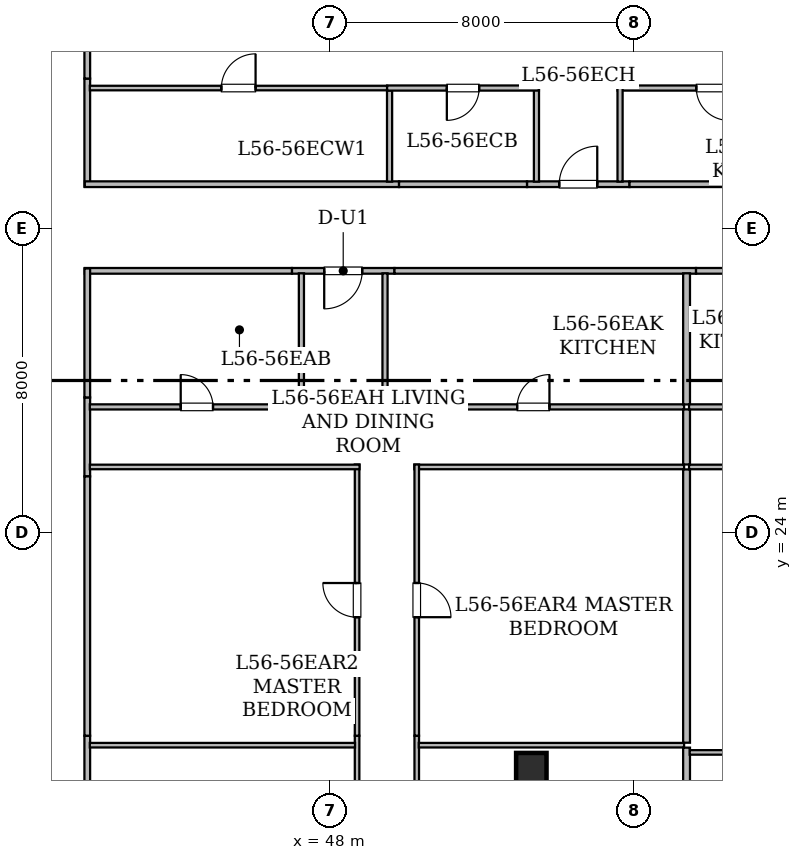
"""IFC4 building model, lengths in metres.
Left out: names, types, materials, properties, quantities, classifications, styles, units other than length and angle.
Written with IfcOpenShell. Run it as: python <this file> out.ifc"""

import sys

from ifc_helpers import new_model, si_unit, direction, frame, frame_2d, origin, origin_2d, place, context, subcontext, project, spatial, rectangle, hollow_rectangle, extrude, element, fill, save


model = new_model("IFC4")
c1 = context("Model", 3, precision=1e-05, world=origin(), true_north=direction((0.0, 1.0)))
c2 = subcontext(c1, "Body", "Model", "MODEL_VIEW")
j1 = project(units=[si_unit("LENGTHUNIT", "METRE"), si_unit("PLANEANGLEUNIT", "RADIAN")], contexts=[c1])
p1 = place(None, origin())
s1 = spatial("IfcSite", under=j1, at=p1, CompositionType="ELEMENT")
p2 = place(p1, origin())
s2 = spatial("IfcBuilding", under=s1, at=p2, CompositionType="ELEMENT")
p3 = place(p2, frame((0.0, 0.0, 220.85)))
s3 = spatial("IfcBuildingStorey", under=s2, at=p3, CompositionType="ELEMENT", Elevation=220.85)
p4 = place(p3, frame((53.3, 17.8, 0.0), z_axis=(0.0, 0.0, 1.0), x_axis=(1.0, 0.0, 0.0)))
e1 = element("IfcColumn", 1, at=p4, inside=s3, PredefinedType="COLUMN", context=c2, shape_type="SweptSolid", body=[
    extrude(hollow_rectangle(XDim=0.8, YDim=0.8, WallThickness=0.04, at=origin_2d()), origin(), (0.0, 0.0, 1.0), 3.65),
])
p5 = place(p3, frame((49.699, 30.885, 0.0), z_axis=(0.0, 0.0, 1.0), x_axis=(-1.0, 0.0, 0.0)))
e2 = element("IfcWall", 2, at=p5, inside=s3, PredefinedType="STANDARD", context=c2, shape_type="SweptSolid", body=[
    extrude(rectangle(XDim=2.698, YDim=0.15, at=frame_2d((1.349, 0.0))), origin(), (0.0, 0.0, 1.0), 3.43),
])
p6 = place(p5, frame((0.849, 0.0, 0.0)))
e3 = element("IfcOpeningElement", 3, at=p6, cuts=e2, PredefinedType="OPENING", context=c2, shape_type="SweptSolid", body=[
    extrude(rectangle(XDim=1.0, YDim=2.15, at=frame_2d((0.5, 1.075))), frame((0.0, 0.085, 0.0), z_axis=(0.0, -1.0, 0.0), x_axis=(1.0, 0.0, 0.0)), (0.0, 0.0, 1.0), 0.17),
])
p7 = place(p3, frame((41.615, 27.554, 0.0), z_axis=(0.0, 0.0, 1.0), x_axis=(0.0, -1.0, 0.0)))
e4 = element("IfcWall", 4, at=p7, inside=s3, PredefinedType="STANDARD", context=c2, shape_type="SweptSolid", body=[
    extrude(rectangle(XDim=2.078, YDim=0.15, at=frame_2d((1.039, 0.0))), origin(), (0.0, 0.0, 1.0), 3.43),
])
p8 = place(p3, frame((47.001, 30.885, 0.0), z_axis=(0.0, 0.0, 1.0), x_axis=(-1.0, 0.0, 0.0)))
e5 = element("IfcWall", 5, at=p8, inside=s3, PredefinedType="STANDARD", context=c2, shape_type="SweptSolid", body=[
    extrude(rectangle(XDim=5.451, YDim=0.15, at=frame_2d((2.726, 0.0))), origin(), (0.0, 0.0, 1.0), 3.43),
])
p9 = place(p3, frame((41.615, 30.948, 0.0), z_axis=(0.0, 0.0, 1.0), x_axis=(0.0, -1.0, 0.0)))
e6 = element("IfcWall", 6, at=p9, inside=s3, PredefinedType="STANDARD", context=c2, shape_type="SweptSolid", body=[
    extrude(rectangle(XDim=3.394, YDim=0.15, at=frame_2d((1.697, 0.0))), origin(), (0.0, 0.0, 1.0), 3.43),
])
p10 = place(p3, frame((57.634, 30.885, 0.0), z_axis=(0.0, 0.0, 1.0), x_axis=(-1.0, 0.0, 0.0)))
e7 = element("IfcWall", 7, at=p10, inside=s3, PredefinedType="STANDARD", context=c2, shape_type="SweptSolid", body=[
    extrude(rectangle(XDim=7.935, YDim=0.15, at=frame_2d((3.968, 0.0))), origin(), (0.0, 0.0, 1.0), 2.725),
])
p11 = place(p3, frame((41.615, 18.653, 0.0), z_axis=(0.0, 0.0, 1.0), x_axis=(0.0, -1.0, 0.0)))
e8 = element("IfcWall", 8, at=p11, inside=s3, PredefinedType="STANDARD", context=c2, shape_type="SweptSolid", body=[
    extrude(rectangle(XDim=1.753, YDim=0.15, at=frame_2d((0.876, 0.0))), origin(), (0.0, 0.0, 1.0), 2.725),
])
p12 = place(p3, frame((41.615, 25.476, 0.0), z_axis=(0.0, 0.0, 1.0), x_axis=(0.0, -1.0, 0.0)))
e9 = element("IfcWall", 9, at=p12, inside=s3, PredefinedType="STANDARD", context=c2, shape_type="SweptSolid", body=[
    extrude(rectangle(XDim=6.823, YDim=0.15, at=frame_2d((3.412, 0.0))), origin(), (0.0, 0.0, 1.0), 2.725),
])
p13 = place(p3, frame((62.142, 30.885, 0.0), z_axis=(0.0, 0.0, 1.0), x_axis=(-1.0, 0.0, 0.0)))
e10 = element("IfcWall", 10, at=p13, inside=s3, PredefinedType="STANDARD", context=c2, shape_type="SweptSolid", body=[
    extrude(rectangle(XDim=4.508, YDim=0.15, at=frame_2d((2.254, 0.0))), origin(), (0.0, 0.0, 1.0), 3.43),
])
p14 = place(p3, frame((41.615, 35.944, 0.0), z_axis=(0.0, 0.0, 1.0), x_axis=(0.0, -1.0, 0.0)))
e11 = element("IfcWall", 11, at=p14, inside=s3, PredefinedType="STANDARD", context=c2, shape_type="SweptSolid", body=[
    extrude(rectangle(XDim=2.844, YDim=0.15, at=frame_2d((1.422, 0.0))), origin(), (0.0, 0.0, 1.0), 3.065),
])
p15 = place(p3, frame((41.55, 33.165, 0.0), z_axis=(0.0, 0.0, 1.0), x_axis=(1.0, 0.0, 0.0)))
e12 = element("IfcWall", 12, at=p15, inside=s3, PredefinedType="STANDARD", context=c2, shape_type="SweptSolid", body=[
    extrude(rectangle(XDim=8.269, YDim=0.15, at=frame_2d((4.135, 0.0))), origin(), (0.0, 0.0, 1.0), 3.065),
])
p16 = place(p3, frame((41.615, 37.524, 0.0), z_axis=(0.0, 0.0, 1.0), x_axis=(0.0, -1.0, 0.0)))
e13 = element("IfcWall", 13, at=p16, inside=s3, PredefinedType="STANDARD", context=c2, shape_type="SweptSolid", body=[
    extrude(rectangle(XDim=1.58, YDim=0.15, at=frame_2d((0.79, 0.0))), origin(), (0.0, 0.0, 1.0), 2.725),
])
p17 = place(p3, frame((53.186, 33.165, 0.0), z_axis=(0.0, 0.0, 1.0), x_axis=(1.0, 0.0, 0.0)))
e14 = element("IfcWall", 14, at=p17, inside=s3, PredefinedType="STANDARD", context=c2, shape_type="SweptSolid", body=[
    extrude(rectangle(XDim=2.698, YDim=0.15, at=frame_2d((1.349, 0.0))), origin(), (0.0, 0.0, 1.0), 2.725),
])
p18 = place(p17, frame((0.849, 0.0, 0.0)))
e15 = element("IfcOpeningElement", 15, at=p18, cuts=e14, PredefinedType="OPENING", context=c2, shape_type="SweptSolid", body=[
    extrude(rectangle(XDim=1.0, YDim=2.15, at=frame_2d((0.5, 1.075))), frame((0.0, 0.085, 0.0), z_axis=(0.0, -1.0, 0.0), x_axis=(1.0, 0.0, 0.0)), (0.0, 0.0, 1.0), 0.17),
])
p19 = place(p3, frame((49.819, 33.165, 0.0), z_axis=(0.0, 0.0, 1.0), x_axis=(1.0, 0.0, 0.0)))
e16 = element("IfcWall", 16, at=p19, inside=s3, PredefinedType="STANDARD", context=c2, shape_type="SweptSolid", body=[
    extrude(rectangle(XDim=3.367, YDim=0.15, at=frame_2d((1.684, 0.0))), origin(), (0.0, 0.0, 1.0), 2.725),
])
p20 = place(p3, frame((55.884, 33.165, 0.0), z_axis=(0.0, 0.0, 1.0), x_axis=(1.0, 0.0, 0.0)))
e17 = element("IfcWall", 17, at=p20, inside=s3, PredefinedType="STANDARD", context=c2, shape_type="SweptSolid", body=[
    extrude(rectangle(XDim=4.367, YDim=0.15, at=frame_2d((2.184, 0.0))), origin(), (0.0, 0.0, 1.0), 3.065),
])
p21 = place(p3, frame((41.682, 27.305, 0.0), z_axis=(0.0, 0.0, 1.0), x_axis=(1.0, 0.0, 0.0)))
e18 = element("IfcWall", 18, at=p21, inside=s3, PredefinedType="PARTITIONING", context=c2, shape_type="SweptSolid", body=[
    extrude(rectangle(XDim=5.633, YDim=0.135, at=frame_2d((2.816, 0.0))), origin(), (0.0, 0.0, 1.0), 3.43),
])
p22 = place(p21, frame((2.392, 0.0, 0.0)))
e19 = element("IfcOpeningElement", 19, at=p22, cuts=e18, PredefinedType="OPENING", context=c2, shape_type="SweptSolid", body=[
    extrude(rectangle(XDim=0.85, YDim=2.1, at=frame_2d((0.425, 1.05))), frame((0.0, 0.077, 0.0), z_axis=(0.0, -1.0, 0.0), x_axis=(1.0, 0.0, 0.0)), (0.0, 0.0, 1.0), 0.155),
])
for number, where, z_axis, x_axis in (
    (20, (47.25, 27.24, 0.0), (0.0, 0.0, 1.0), (0.0, 1.0, 0.0)),
    (21, (49.45, 30.82, 0.0), (0.0, 0.0, 1.0), (0.0, -1.0, 0.0)),
):
    element("IfcWall", number, at=place(p3, frame(where, z_axis=z_axis, x_axis=x_axis)), inside=s3, PredefinedType="PARTITIONING", context=c2, shape_type="SweptSolid", body=[
        extrude(rectangle(XDim=3.58, YDim=0.135, at=frame_2d((1.79, 0.0))), origin(), (0.0, 0.0, 1.0), 3.43),
    ])
p23 = place(p3, frame((49.385, 27.305, 0.0), z_axis=(0.0, 0.0, 1.0), x_axis=(1.0, 0.0, 0.0)))
e22 = element("IfcWall", 22, at=p23, inside=s3, PredefinedType="PARTITIONING", context=c2, shape_type="SweptSolid", body=[
    extrude(rectangle(XDim=7.935, YDim=0.135, at=frame_2d((3.968, 0.0))), origin(), (0.0, 0.0, 1.0), 2.725),
])
p24 = place(p23, frame((3.542, 0.0, 0.0)))
e23 = element("IfcOpeningElement", 23, at=p24, cuts=e22, PredefinedType="OPENING", context=c2, shape_type="SweptSolid", body=[
    extrude(rectangle(XDim=0.85, YDim=2.1, at=frame_2d((0.425, 1.05))), frame((0.0, 0.077, 0.0), z_axis=(0.0, -1.0, 0.0), x_axis=(1.0, 0.0, 0.0)), (0.0, 0.0, 1.0), 0.155),
])
p25 = place(p3, frame((48.715, 12.192, 0.0), z_axis=(0.0, 0.0, 1.0), x_axis=(0.0, 1.0, 0.0)))
e24 = element("IfcWall", 24, at=p25, inside=s3, PredefinedType="PARTITIONING", context=c2, shape_type="SweptSolid", body=[
    extrude(rectangle(XDim=6.461, YDim=0.12, at=frame_2d((3.23, 0.0))), origin(), (0.0, 0.0, 1.0), 2.725),
])
p26 = place(p25, frame((2.759, 0.0, 0.0)))
e25 = element("IfcOpeningElement", 25, at=p26, cuts=e24, PredefinedType="OPENING", context=c2, shape_type="SweptSolid", body=[
    extrude(rectangle(XDim=0.9, YDim=2.1, at=frame_2d((0.45, 1.05))), frame((0.0, 0.07, 0.0), z_axis=(0.0, -1.0, 0.0), x_axis=(1.0, 0.0, 0.0)), (0.0, 0.0, 1.0), 0.14),
])
p27 = place(p3, frame((48.715, 18.653, 0.0), z_axis=(0.0, 0.0, 1.0), x_axis=(0.0, 1.0, 0.0)))
e26 = element("IfcWall", 26, at=p27, inside=s3, PredefinedType="PARTITIONING", context=c2, shape_type="SweptSolid", body=[
    extrude(rectangle(XDim=7.137, YDim=0.12, at=frame_2d((3.568, 0.0))), origin(), (0.0, 0.0, 1.0), 3.43),
])
p28 = place(p27, frame((3.118, 0.0, 0.0)))
e27 = element("IfcOpeningElement", 27, at=p28, cuts=e26, PredefinedType="OPENING", context=c2, shape_type="SweptSolid", body=[
    extrude(rectangle(XDim=0.9, YDim=2.1, at=frame_2d((0.45, 1.05))), frame((0.0, 0.07, 0.0), z_axis=(0.0, -1.0, 0.0), x_axis=(1.0, 0.0, 0.0)), (0.0, 0.0, 1.0), 0.14),
])
p29 = place(p3, frame((48.78, 25.725, 0.0), z_axis=(0.0, 0.0, 1.0), x_axis=(-1.0, 0.0, 0.0)))
e28 = element("IfcWall", 28, at=p29, inside=s3, PredefinedType="PARTITIONING", context=c2, shape_type="SweptSolid", body=[
    extrude(rectangle(XDim=7.098, YDim=0.12, at=frame_2d((3.549, 0.0))), origin(), (0.0, 0.0, 1.0), 3.43),
])
p30 = place(p3, frame((50.285, 18.653, 0.0), z_axis=(0.0, 0.0, 1.0), x_axis=(0.0, -1.0, 0.0)))
e29 = element("IfcWall", 29, at=p30, inside=s3, PredefinedType="PARTITIONING", context=c2, shape_type="SweptSolid", body=[
    extrude(rectangle(XDim=6.461, YDim=0.12, at=frame_2d((3.23, 0.0))), origin(), (0.0, 0.0, 1.0), 2.725),
])
p31 = place(p30, frame((2.801, 0.0, 0.0)))
e30 = element("IfcOpeningElement", 30, at=p31, cuts=e29, PredefinedType="OPENING", context=c2, shape_type="SweptSolid", body=[
    extrude(rectangle(XDim=0.9, YDim=2.1, at=frame_2d((0.45, 1.05))), frame((0.0, 0.07, 0.0), z_axis=(0.0, -1.0, 0.0), x_axis=(1.0, 0.0, 0.0)), (0.0, 0.0, 1.0), 0.14),
])
p32 = place(p3, frame((57.32, 25.725, 0.0), z_axis=(0.0, 0.0, 1.0), x_axis=(-1.0, 0.0, 0.0)))
e31 = element("IfcWall", 31, at=p32, inside=s3, PredefinedType="PARTITIONING", context=c2, shape_type="SweptSolid", body=[
    extrude(rectangle(XDim=7.1, YDim=0.12, at=frame_2d((3.55, 0.0))), origin(), (0.0, 0.0, 1.0), 2.725),
])
p33 = place(p3, frame((50.285, 25.79, 0.0), z_axis=(0.0, 0.0, 1.0), x_axis=(0.0, -1.0, 0.0)))
e32 = element("IfcWall", 32, at=p33, inside=s3, PredefinedType="PARTITIONING", context=c2, shape_type="SweptSolid", body=[
    extrude(rectangle(XDim=7.137, YDim=0.12, at=frame_2d((3.568, 0.0))), origin(), (0.0, 0.0, 1.0), 3.43),
])
p34 = place(p33, frame((3.118, 0.0, 0.0)))
e33 = element("IfcOpeningElement", 33, at=p34, cuts=e32, PredefinedType="OPENING", context=c2, shape_type="SweptSolid", body=[
    extrude(rectangle(XDim=0.9, YDim=2.1, at=frame_2d((0.45, 1.05))), frame((0.0, 0.07, 0.0), z_axis=(0.0, -1.0, 0.0), x_axis=(1.0, 0.0, 0.0)), (0.0, 0.0, 1.0), 0.14),
])
p35 = place(p3, frame((57.385, 27.24, 0.0), z_axis=(0.0, 0.0, 1.0), x_axis=(0.0, -1.0, 0.0)))
e34 = element("IfcWall", 34, at=p35, inside=s3, PredefinedType="STANDARD", context=c2, shape_type="SweptSolid", body=[
    extrude(rectangle(XDim=1.45, YDim=0.18, at=frame_2d((0.725, 0.0))), origin(), (0.0, 0.0, 1.0), 3.43),
])
p36 = place(p3, frame((57.385, 30.82, 0.0), z_axis=(0.0, 0.0, 1.0), x_axis=(0.0, -1.0, 0.0)))
e35 = element("IfcWall", 35, at=p36, inside=s3, PredefinedType="STANDARD", context=c2, shape_type="SweptSolid", body=[
    extrude(rectangle(XDim=3.45, YDim=0.18, at=frame_2d((1.725, 0.0))), origin(), (0.0, 0.0, 1.0), 3.43),
])
p37 = place(p3, frame((41.682, 18.404, 0.0), z_axis=(0.0, 0.0, 1.0), x_axis=(1.0, 0.0, 0.0)))
e36 = element("IfcWall", 36, at=p37, inside=s3, PredefinedType="PARTITIONING", context=c2, shape_type="SweptSolid", body=[
    extrude(rectangle(XDim=6.979, YDim=0.12, at=frame_2d((3.49, 0.0))), origin(), (0.0, 0.0, 1.0), 2.725),
])
p38 = place(p3, frame((50.339, 18.404, 0.0), z_axis=(0.0, 0.0, 1.0), x_axis=(1.0, 0.0, 0.0)))
e37 = element("IfcWall", 37, at=p38, inside=s3, PredefinedType="PARTITIONING", context=c2, shape_type="SweptSolid", body=[
    extrude(rectangle(XDim=6.981, YDim=0.12, at=frame_2d((3.49, 0.0))), origin(), (0.0, 0.0, 1.0), 2.725),
])
p39 = place(p3, frame((57.385, 18.339, 0.0), z_axis=(0.0, 0.0, 1.0), x_axis=(0.0, -1.0, 0.0)))
e38 = element("IfcWall", 38, at=p39, inside=s3, PredefinedType="STANDARD", context=c2, shape_type="SweptSolid", body=[
    extrude(rectangle(XDim=6.147, YDim=0.18, at=frame_2d((3.074, 0.0))), origin(), (0.0, 0.0, 1.0), 2.725),
])
p40 = place(p3, frame((57.385, 25.66, 0.0), z_axis=(0.0, 0.0, 1.0), x_axis=(0.0, -1.0, 0.0)))
e39 = element("IfcWall", 39, at=p40, inside=s3, PredefinedType="STANDARD", context=c2, shape_type="SweptSolid", body=[
    extrude(rectangle(XDim=7.191, YDim=0.18, at=frame_2d((3.595, 0.0))), origin(), (0.0, 0.0, 1.0), 2.725),
])
p41 = place(p3, frame((57.45, 27.305, 0.0), z_axis=(0.0, 0.0, 1.0), x_axis=(1.0, 0.0, 0.0)))
e40 = element("IfcWall", 40, at=p41, inside=s3, PredefinedType="PARTITIONING", context=c2, shape_type="SweptSolid", body=[
    extrude(rectangle(XDim=5.006, YDim=0.135, at=frame_2d((2.503, 0.0))), origin(), (0.0, 0.0, 1.0), 3.43),
])
p42 = place(p41, frame((2.078, 0.0, 0.0)))
e41 = element("IfcOpeningElement", 41, at=p42, cuts=e40, PredefinedType="OPENING", context=c2, shape_type="SweptSolid", body=[
    extrude(rectangle(XDim=0.85, YDim=2.1, at=frame_2d((0.425, 1.05))), frame((0.0, 0.077, 0.0), z_axis=(0.0, -1.0, 0.0), x_axis=(1.0, 0.0, 0.0)), (0.0, 0.0, 1.0), 0.155),
])
p43 = place(p3, frame((62.85, 25.725, 0.0), z_axis=(0.0, 0.0, 1.0), x_axis=(-1.0, 0.0, 0.0)))
e42 = element("IfcWall", 42, at=p43, inside=s3, PredefinedType="PARTITIONING", context=c2, shape_type="SweptSolid", body=[
    extrude(rectangle(XDim=5.4, YDim=0.12, at=frame_2d((2.7, 0.0))), origin(), (0.0, 0.0, 1.0), 3.43),
])
p44 = place(p3, frame((57.467, 18.214, 0.0), z_axis=(0.0, 0.0, 1.0), x_axis=(1.0, 0.0, 0.0)))
e43 = element("IfcWall", 43, at=p44, inside=s3, PredefinedType="PARTITIONING", context=c2, shape_type="SweptSolid", body=[
    extrude(rectangle(XDim=5.264, YDim=0.12, at=frame_2d((2.632, 0.0))), origin(), (0.0, 0.0, 1.0), 3.43),
])
p45 = place(p3, frame((41.682, 35.695, 0.0), z_axis=(0.0, 0.0, 1.0), x_axis=(1.0, 0.0, 0.0)))
e44 = element("IfcWall", 44, at=p45, inside=s3, PredefinedType="PARTITIONING", context=c2, shape_type="SweptSolid", body=[
    extrude(rectangle(XDim=7.823, YDim=0.12, at=frame_2d((3.912, 0.0))), origin(), (0.0, 0.0, 1.0), 3.43),
])
p46 = place(p45, frame((3.462, 0.0, 0.0)))
e45 = element("IfcOpeningElement", 45, at=p46, cuts=e44, PredefinedType="OPENING", context=c2, shape_type="SweptSolid", body=[
    extrude(rectangle(XDim=0.9, YDim=2.1, at=frame_2d((0.45, 1.05))), frame((0.0, 0.07, 0.0), z_axis=(0.0, -1.0, 0.0), x_axis=(1.0, 0.0, 0.0)), (0.0, 0.0, 1.0), 0.14),
])
p47 = place(p3, frame((49.57, 35.63, 0.0), z_axis=(0.0, 0.0, 1.0), x_axis=(0.0, -1.0, 0.0)))
e46 = element("IfcWall", 46, at=p47, inside=s3, PredefinedType="PARTITIONING", context=c2, shape_type="SweptSolid", body=[
    extrude(rectangle(XDim=2.398, YDim=0.135, at=frame_2d((1.199, 0.0))), origin(), (0.0, 0.0, 1.0), 3.065),
])
p48 = place(p3, frame((53.435, 33.232, 0.0), z_axis=(0.0, 0.0, 1.0), x_axis=(0.0, 1.0, 0.0)))
e47 = element("IfcWall", 47, at=p48, inside=s3, PredefinedType="PARTITIONING", context=c2, shape_type="SweptSolid", body=[
    extrude(rectangle(XDim=2.528, YDim=0.135, at=frame_2d((1.264, 0.0))), origin(), (0.0, 0.0, 1.0), 2.725),
])
p49 = place(p3, frame((53.5, 35.695, 0.0), z_axis=(0.0, 0.0, 1.0), x_axis=(-1.0, 0.0, 0.0)))
e48 = element("IfcWall", 48, at=p49, inside=s3, PredefinedType="PARTITIONING", context=c2, shape_type="SweptSolid", body=[
    extrude(rectangle(XDim=3.995, YDim=0.135, at=frame_2d((1.998, 0.0))), origin(), (0.0, 0.0, 1.0), 2.725),
])
p50 = place(p49, frame((1.573, 0.0, 0.0)))
e49 = element("IfcOpeningElement", 49, at=p50, cuts=e48, PredefinedType="OPENING", context=c2, shape_type="SweptSolid", body=[
    extrude(rectangle(XDim=0.85, YDim=2.1, at=frame_2d((0.425, 1.05))), frame((0.0, 0.077, 0.0), z_axis=(0.0, -1.0, 0.0), x_axis=(1.0, 0.0, 0.0)), (0.0, 0.0, 1.0), 0.155),
])
p51 = place(p3, frame((60.565, 35.695, 0.0), z_axis=(0.0, 0.0, 1.0), x_axis=(-1.0, 0.0, 0.0)))
e50 = element("IfcWall", 50, at=p51, inside=s3, PredefinedType="PARTITIONING", context=c2, shape_type="SweptSolid", body=[
    extrude(rectangle(XDim=4.995, YDim=0.135, at=frame_2d((2.498, 0.0))), origin(), (0.0, 0.0, 1.0), 3.43),
])
p52 = place(p51, frame((2.073, 0.0, 0.0)))
e51 = element("IfcOpeningElement", 51, at=p52, cuts=e50, PredefinedType="OPENING", context=c2, shape_type="SweptSolid", body=[
    extrude(rectangle(XDim=0.85, YDim=2.1, at=frame_2d((0.425, 1.05))), frame((0.0, 0.077, 0.0), z_axis=(0.0, -1.0, 0.0), x_axis=(1.0, 0.0, 0.0)), (0.0, 0.0, 1.0), 0.155),
])
p53 = place(p3, frame((55.635, 35.76, 0.0), z_axis=(0.0, 0.0, 1.0), x_axis=(0.0, -1.0, 0.0)))
e52 = element("IfcWall", 52, at=p53, inside=s3, PredefinedType="PARTITIONING", context=c2, shape_type="SweptSolid", body=[
    extrude(rectangle(XDim=2.528, YDim=0.135, at=frame_2d((1.264, 0.0))), origin(), (0.0, 0.0, 1.0), 3.065),
])
p54 = place(p6, origin())
e53 = element("IfcDoor", 53, at=p54, inside=s3, OperationType="SINGLE_SWING_RIGHT", PredefinedType="DOOR", context=c2, shape_type="SweptSolid", body=[
    extrude(rectangle(XDim=1.0, YDim=2.15, at=frame_2d((0.5, 1.075))), frame((0.0, 0.025, 0.0), z_axis=(0.0, -1.0, 0.0), x_axis=(1.0, 0.0, 0.0)), (0.0, 0.0, 1.0), 0.05),
])
fill(e3, e53)
p55 = place(p18, origin())
e54 = element("IfcDoor", 54, at=p55, inside=s3, OperationType="SINGLE_SWING_RIGHT", PredefinedType="DOOR", context=c2, shape_type="SweptSolid", body=[
    extrude(rectangle(XDim=1.0, YDim=2.15, at=frame_2d((0.5, 1.075))), frame((0.0, 0.025, 0.0), z_axis=(0.0, -1.0, 0.0), x_axis=(1.0, 0.0, 0.0)), (0.0, 0.0, 1.0), 0.05),
])
fill(e15, e54)
p56 = place(p22, origin())
e55 = element("IfcDoor", 55, at=p56, inside=s3, OperationType="SINGLE_SWING_LEFT", PredefinedType="DOOR", context=c2, shape_type="SweptSolid", body=[
    extrude(rectangle(XDim=0.85, YDim=2.1, at=frame_2d((0.425, 1.05))), frame((0.0, 0.025, 0.0), z_axis=(0.0, -1.0, 0.0), x_axis=(1.0, 0.0, 0.0)), (0.0, 0.0, 1.0), 0.05),
])
fill(e19, e55)
p57 = place(p24, origin())
e56 = element("IfcDoor", 56, at=p57, inside=s3, OperationType="SINGLE_SWING_RIGHT", PredefinedType="DOOR", context=c2, shape_type="SweptSolid", body=[
    extrude(rectangle(XDim=0.85, YDim=2.1, at=frame_2d((0.425, 1.05))), frame((0.0, 0.025, 0.0), z_axis=(0.0, -1.0, 0.0), x_axis=(1.0, 0.0, 0.0)), (0.0, 0.0, 1.0), 0.05),
])
fill(e23, e56)
p58 = place(p28, origin())
e57 = element("IfcDoor", 57, at=p58, inside=s3, OperationType="SINGLE_SWING_RIGHT", PredefinedType="DOOR", context=c2, shape_type="SweptSolid", body=[
    extrude(rectangle(XDim=0.9, YDim=2.1, at=frame_2d((0.45, 1.05))), frame((0.0, 0.025, 0.0), z_axis=(0.0, -1.0, 0.0), x_axis=(1.0, 0.0, 0.0)), (0.0, 0.0, 1.0), 0.05),
])
fill(e27, e57)
p59 = place(p34, origin())
e58 = element("IfcDoor", 58, at=p59, inside=s3, OperationType="SINGLE_SWING_RIGHT", PredefinedType="DOOR", context=c2, shape_type="SweptSolid", body=[
    extrude(rectangle(XDim=0.9, YDim=2.1, at=frame_2d((0.45, 1.05))), frame((0.0, 0.025, 0.0), z_axis=(0.0, -1.0, 0.0), x_axis=(1.0, 0.0, 0.0)), (0.0, 0.0, 1.0), 0.05),
])
fill(e33, e58)
p60 = place(p46, origin())
e59 = element("IfcDoor", 59, at=p60, inside=s3, OperationType="SINGLE_SWING_RIGHT", PredefinedType="DOOR", context=c2, shape_type="SweptSolid", body=[
    extrude(rectangle(XDim=0.9, YDim=2.1, at=frame_2d((0.45, 1.05))), frame((0.0, 0.025, 0.0), z_axis=(0.0, -1.0, 0.0), x_axis=(1.0, 0.0, 0.0)), (0.0, 0.0, 1.0), 0.05),
])
fill(e45, e59)
p61 = place(p50, origin())
e60 = element("IfcDoor", 60, at=p61, inside=s3, OperationType="SINGLE_SWING_RIGHT", PredefinedType="DOOR", context=c2, shape_type="SweptSolid", body=[
    extrude(rectangle(XDim=0.85, YDim=2.1, at=frame_2d((0.425, 1.05))), frame((0.0, 0.025, 0.0), z_axis=(0.0, -1.0, 0.0), x_axis=(1.0, 0.0, 0.0)), (0.0, 0.0, 1.0), 0.05),
])
fill(e49, e60)
p62 = place(p52, origin())
e61 = element("IfcDoor", 61, at=p62, inside=s3, OperationType="SINGLE_SWING_LEFT", PredefinedType="DOOR", context=c2, shape_type="SweptSolid", body=[
    extrude(rectangle(XDim=0.85, YDim=2.1, at=frame_2d((0.425, 1.05))), frame((0.0, 0.025, 0.0), z_axis=(0.0, -1.0, 0.0), x_axis=(1.0, 0.0, 0.0)), (0.0, 0.0, 1.0), 0.05),
])
fill(e51, e61)
save(model, sys.argv[1])
